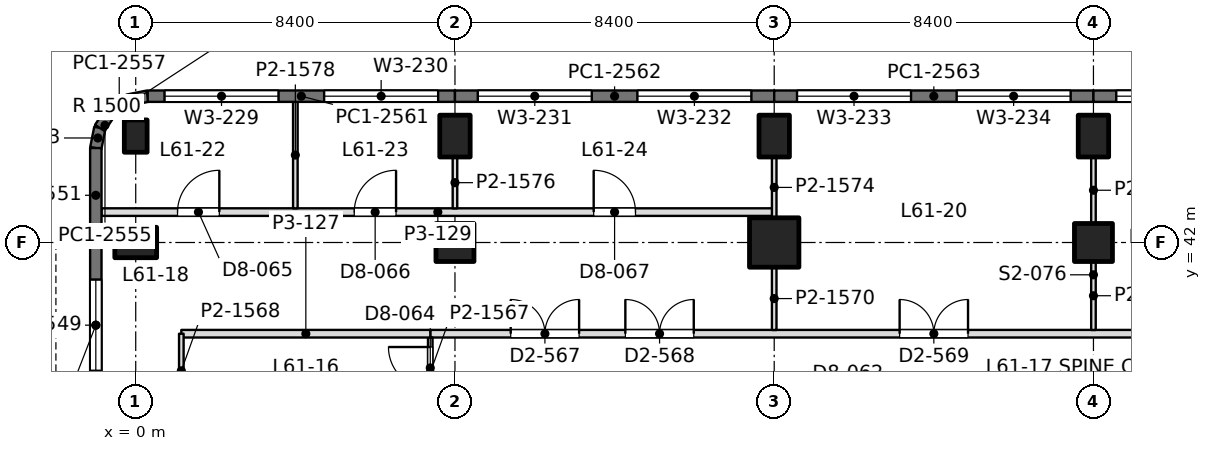
"""IFC4 building model, lengths in metres.
Left out: names, types, materials, properties, quantities, classifications, styles, units other than length and angle.
Written with IfcOpenShell. Run it as: python <this file> out.ifc"""

import sys

from ifc_helpers import new_model, si_unit, direction, frame, frame_2d, origin, origin_2d, place, context, subcontext, project, spatial, rectangle, extrude, element, fill, save


model = new_model("IFC4")
c1 = context("Model", 3, precision=1e-05, world=origin(), true_north=direction((0.0, 1.0)))
c2 = subcontext(c1, "Body", "Model", "MODEL_VIEW")
j1 = project(units=[si_unit("LENGTHUNIT", "METRE"), si_unit("PLANEANGLEUNIT", "RADIAN")], contexts=[c1])
p1 = place(None, origin())
s1 = spatial("IfcSite", under=j1, at=p1, CompositionType="ELEMENT")
p2 = place(p1, origin())
s2 = spatial("IfcBuilding", under=s1, at=p2, CompositionType="ELEMENT")
p3 = place(p2, frame((0.0, 0.0, 268.2)))
s3 = spatial("IfcBuildingStorey", under=s2, at=p3, CompositionType="ELEMENT", Elevation=268.2)
p4 = place(p3, frame((0.0, 42.0, 0.0), z_axis=(0.0, 0.0, 1.0), x_axis=(0.0, 1.0, 0.0)))
e1 = element("IfcColumn", 1, at=p4, inside=s3, PredefinedType="COLUMN", context=c2, shape_type="SweptSolid", body=[
    extrude(rectangle(XDim=0.8, YDim=1.1, at=origin_2d()), origin(), (0.0, 0.0, 1.0), 4.5),
])
p5 = place(p3, frame((0.0, 44.8, 0.0), z_axis=(0.0, 0.0, 1.0), x_axis=(1.0, 0.0, 0.0)))
e2 = element("IfcColumn", 2, at=p5, inside=s3, PredefinedType="COLUMN", context=c2, shape_type="SweptSolid", body=[
    extrude(rectangle(XDim=0.6, YDim=0.85, at=origin_2d()), origin(), (0.0, 0.0, 1.0), 4.5),
])
p6 = place(p3, frame((8.4, 42.0, 0.0), z_axis=(0.0, 0.0, 1.0), x_axis=(1.0, 0.0, 0.0)))
e3 = element("IfcColumn", 3, at=p6, inside=s3, PredefinedType="COLUMN", context=c2, shape_type="SweptSolid", body=[
    extrude(rectangle(XDim=1.0, YDim=1.0, at=origin_2d()), origin(), (0.0, 0.0, 1.0), 4.5),
])
p7 = place(p3, frame((8.4, 44.8, 0.0), z_axis=(0.0, 0.0, 1.0), x_axis=(1.0, 0.0, 0.0)))
e4 = element("IfcColumn", 4, at=p7, inside=s3, PredefinedType="COLUMN", context=c2, shape_type="SweptSolid", body=[
    extrude(rectangle(XDim=0.8, YDim=1.1, at=origin_2d()), origin(), (0.0, 0.0, 1.0), 4.5),
])
p8 = place(p3, frame((16.8, 42.0, 0.0), z_axis=(0.0, 0.0, 1.0), x_axis=(1.0, 0.0, 0.0)))
e5 = element("IfcColumn", 5, at=p8, inside=s3, PredefinedType="COLUMN", context=c2, shape_type="SweptSolid", body=[
    extrude(rectangle(XDim=1.3, YDim=1.3, at=origin_2d()), origin(), (0.0, 0.0, 1.0), 4.5),
])
p9 = place(p3, frame((16.8, 44.8, 0.0), z_axis=(0.0, 0.0, 1.0), x_axis=(1.0, 0.0, 0.0)))
e6 = element("IfcColumn", 6, at=p9, inside=s3, PredefinedType="COLUMN", context=c2, shape_type="SweptSolid", body=[
    extrude(rectangle(XDim=0.8, YDim=1.1, at=origin_2d()), origin(), (0.0, 0.0, 1.0), 4.5),
])
p10 = place(p3, frame((25.2, 42.0, 0.0), z_axis=(0.0, 0.0, 1.0), x_axis=(1.0, 0.0, 0.0)))
e7 = element("IfcColumn", 7, at=p10, inside=s3, PredefinedType="COLUMN", context=c2, shape_type="SweptSolid", body=[
    extrude(rectangle(XDim=1.0, YDim=1.0, at=origin_2d()), origin(), (0.0, 0.0, 1.0), 4.5),
])
p11 = place(p3, frame((25.2, 44.8, 0.0), z_axis=(0.0, 0.0, 1.0), x_axis=(1.0, 0.0, 0.0)))
e8 = element("IfcColumn", 8, at=p11, inside=s3, PredefinedType="COLUMN", context=c2, shape_type="SweptSolid", body=[
    extrude(rectangle(XDim=0.8, YDim=1.1, at=origin_2d()), origin(), (0.0, 0.0, 1.0), 4.5),
])
p12 = place(p3, frame((-1.05, 37.65, 0.0), z_axis=(0.0, 0.0, 1.0), x_axis=(0.0, 1.0, 0.0)))
e9 = element("IfcWall", 9, at=p12, inside=s3, PredefinedType="SOLIDWALL", context=c2, shape_type="SweptSolid", body=[
    extrude(rectangle(XDim=4.35, YDim=0.3, at=frame_2d((2.175, 0.0))), origin(), (0.0, 0.0, 1.0), 4.35),
])
p13 = place(p12, frame((0.975, 0.0, 0.9)))
e10 = element("IfcOpeningElement", 10, at=p13, cuts=e9, PredefinedType="OPENING", context=c2, shape_type="SweptSolid", body=[
    extrude(rectangle(XDim=2.4, YDim=1.9, at=frame_2d((1.2, 0.95))), frame((0.0, 0.16, 0.0), z_axis=(0.0, -1.0, 0.0), x_axis=(1.0, 0.0, 0.0)), (0.0, 0.0, 1.0), 0.32),
])
p14 = place(p3, frame((-1.05, 42.0, 0.0), z_axis=(0.0, 0.0, 1.0), x_axis=(0.0, 1.0, 0.0)))
e11 = element("IfcWall", 11, at=p14, inside=s3, PredefinedType="SOLIDWALL", context=c2, shape_type="SweptSolid", body=[
    extrude(rectangle(XDim=2.485, YDim=0.3, at=frame_2d((1.243, 0.0))), origin(), (0.0, 0.0, 1.0), 4.35),
])
p15 = place(p3, frame((-1.05, 44.485, 0.0), z_axis=(0.0, 0.0, 1.0), x_axis=(0.195073962632, 0.980788534345, 0.0)))
e12 = element("IfcWall", 12, at=p15, inside=s3, PredefinedType="SOLIDWALL", context=c2, shape_type="SweptSolid", body=[
    extrude(rectangle(XDim=0.541, YDim=0.3, at=frame_2d((0.271, 0.0))), origin(), (0.0, 0.0, 1.0), 4.35),
])
p16 = place(p3, frame((-0.945, 45.015, 0.0), z_axis=(0.0, 0.0, 1.0), x_axis=(0.55534295404, 0.831621430339, 0.0)))
e13 = element("IfcWall", 13, at=p16, inside=s3, PredefinedType="SOLIDWALL", context=c2, shape_type="SweptSolid", body=[
    extrude(rectangle(XDim=0.526, YDim=0.3, at=frame_2d((0.263, 0.0))), origin(), (0.0, 0.0, 1.0), 4.35),
])
p17 = place(p3, frame((-0.653, 45.453, 0.0), z_axis=(0.0, 0.0, 1.0), x_axis=(0.831692711774, 0.555236195849, 0.0)))
e14 = element("IfcWall", 14, at=p17, inside=s3, PredefinedType="SOLIDWALL", context=c2, shape_type="SweptSolid", body=[
    extrude(rectangle(XDim=0.525, YDim=0.3, at=frame_2d((0.263, 0.0))), origin(), (0.0, 0.0, 1.0), 4.35),
])
p18 = place(p3, frame((-0.216, 45.744, 0.0), z_axis=(0.0, 0.0, 1.0), x_axis=(0.980702050465, 0.1955082817, 0.0)))
e15 = element("IfcWall", 15, at=p18, inside=s3, PredefinedType="SOLIDWALL", context=c2, shape_type="SweptSolid", body=[
    extrude(rectangle(XDim=0.541, YDim=0.3, at=frame_2d((0.271, 0.0))), origin(), (0.0, 0.0, 1.0), 4.35),
])
p19 = place(p3, frame((0.315, 45.85, 0.0), z_axis=(0.0, 0.0, 1.0), x_axis=(1.0, 0.0, 0.0)))
e16 = element("IfcWall", 16, at=p19, inside=s3, PredefinedType="SOLIDWALL", context=c2, shape_type="SweptSolid", body=[
    extrude(rectangle(XDim=8.085, YDim=0.3, at=frame_2d((4.042, 0.0))), origin(), (0.0, 0.0, 1.0), 4.35),
])
p20 = place(p19, frame((0.443, 0.0, 0.9)))
e17 = element("IfcOpeningElement", 17, at=p20, cuts=e16, PredefinedType="OPENING", context=c2, shape_type="SweptSolid", body=[
    extrude(rectangle(XDim=3.0, YDim=2.4, at=frame_2d((1.5, 1.2))), frame((0.0, 0.16, 0.0), z_axis=(0.0, -1.0, 0.0), x_axis=(1.0, 0.0, 0.0)), (0.0, 0.0, 1.0), 0.32),
])
p21 = place(p19, frame((4.643, 0.0, 0.9)))
e18 = element("IfcOpeningElement", 18, at=p21, cuts=e16, PredefinedType="OPENING", context=c2, shape_type="SweptSolid", body=[
    extrude(rectangle(XDim=3.0, YDim=2.4, at=frame_2d((1.5, 1.2))), frame((0.0, 0.16, 0.0), z_axis=(0.0, -1.0, 0.0), x_axis=(1.0, 0.0, 0.0)), (0.0, 0.0, 1.0), 0.32),
])
p22 = place(p3, frame((8.4, 45.85, 0.0), z_axis=(0.0, 0.0, 1.0), x_axis=(1.0, 0.0, 0.0)))
e19 = element("IfcWall", 19, at=p22, inside=s3, PredefinedType="SOLIDWALL", context=c2, shape_type="SweptSolid", body=[
    extrude(rectangle(XDim=8.4, YDim=0.3, at=frame_2d((4.2, 0.0))), origin(), (0.0, 0.0, 1.0), 4.35),
])
p23 = place(p22, frame((0.6, 0.0, 0.9)))
e20 = element("IfcOpeningElement", 20, at=p23, cuts=e19, PredefinedType="OPENING", context=c2, shape_type="SweptSolid", body=[
    extrude(rectangle(XDim=3.0, YDim=2.4, at=frame_2d((1.5, 1.2))), frame((0.0, 0.16, 0.0), z_axis=(0.0, -1.0, 0.0), x_axis=(1.0, 0.0, 0.0)), (0.0, 0.0, 1.0), 0.32),
])
p24 = place(p22, frame((4.8, 0.0, 0.9)))
e21 = element("IfcOpeningElement", 21, at=p24, cuts=e19, PredefinedType="OPENING", context=c2, shape_type="SweptSolid", body=[
    extrude(rectangle(XDim=3.0, YDim=2.4, at=frame_2d((1.5, 1.2))), frame((0.0, 0.16, 0.0), z_axis=(0.0, -1.0, 0.0), x_axis=(1.0, 0.0, 0.0)), (0.0, 0.0, 1.0), 0.32),
])
p25 = place(p3, frame((16.8, 45.85, 0.0), z_axis=(0.0, 0.0, 1.0), x_axis=(1.0, 0.0, 0.0)))
e22 = element("IfcWall", 22, at=p25, inside=s3, PredefinedType="SOLIDWALL", context=c2, shape_type="SweptSolid", body=[
    extrude(rectangle(XDim=8.4, YDim=0.3, at=frame_2d((4.2, 0.0))), origin(), (0.0, 0.0, 1.0), 4.35),
])
p26 = place(p25, frame((0.6, 0.0, 0.9)))
e23 = element("IfcOpeningElement", 23, at=p26, cuts=e22, PredefinedType="OPENING", context=c2, shape_type="SweptSolid", body=[
    extrude(rectangle(XDim=3.0, YDim=2.4, at=frame_2d((1.5, 1.2))), frame((0.0, 0.16, 0.0), z_axis=(0.0, -1.0, 0.0), x_axis=(1.0, 0.0, 0.0)), (0.0, 0.0, 1.0), 0.32),
])
p27 = place(p25, frame((4.8, 0.0, 0.9)))
e24 = element("IfcOpeningElement", 24, at=p27, cuts=e22, PredefinedType="OPENING", context=c2, shape_type="SweptSolid", body=[
    extrude(rectangle(XDim=3.0, YDim=2.4, at=frame_2d((1.5, 1.2))), frame((0.0, 0.16, 0.0), z_axis=(0.0, -1.0, 0.0), x_axis=(1.0, 0.0, 0.0)), (0.0, 0.0, 1.0), 0.32),
])
p28 = place(p3, frame((25.2, 45.85, 0.0), z_axis=(0.0, 0.0, 1.0), x_axis=(1.0, 0.0, 0.0)))
e25 = element("IfcWall", 25, at=p28, inside=s3, PredefinedType="SOLIDWALL", context=c2, shape_type="SweptSolid", body=[
    extrude(rectangle(XDim=8.4, YDim=0.3, at=frame_2d((4.2, 0.0))), origin(), (0.0, 0.0, 1.0), 4.35),
])
p29 = place(p28, frame((0.6, 0.0, 0.9)))
e26 = element("IfcOpeningElement", 26, at=p29, cuts=e25, PredefinedType="OPENING", context=c2, shape_type="SweptSolid", body=[
    extrude(rectangle(XDim=3.0, YDim=2.4, at=frame_2d((1.5, 1.2))), frame((0.0, 0.16, 0.0), z_axis=(0.0, -1.0, 0.0), x_axis=(1.0, 0.0, 0.0)), (0.0, 0.0, 1.0), 0.32),
])
p30 = place(p28, frame((4.8, 0.0, 0.9)))
e27 = element("IfcOpeningElement", 27, at=p30, cuts=e25, PredefinedType="OPENING", context=c2, shape_type="SweptSolid", body=[
    extrude(rectangle(XDim=3.0, YDim=2.4, at=frame_2d((1.5, 1.2))), frame((0.0, 0.16, 0.0), z_axis=(0.0, -1.0, 0.0), x_axis=(1.0, 0.0, 0.0)), (0.0, 0.0, 1.0), 0.32),
])
p31 = place(p3, frame((-0.902, 42.8, 0.0), z_axis=(0.0, 0.0, 1.0), x_axis=(1.0, 0.0, 0.0)))
e28 = element("IfcWall", 28, at=p31, inside=s3, PredefinedType="PARTITIONING", context=c2, shape_type="SweptSolid", body=[
    extrude(rectangle(XDim=17.702, YDim=0.2, at=frame_2d((8.851, 0.0))), origin(), (0.0, 0.0, 1.0), 3.86),
])
p32 = place(p31, frame((2.002, 0.0, 0.0)))
e29 = element("IfcOpeningElement", 29, at=p32, cuts=e28, PredefinedType="OPENING", context=c2, shape_type="SweptSolid", body=[
    extrude(rectangle(XDim=1.1, YDim=2.4, at=frame_2d((0.55, 1.2))), frame((0.0, 0.11, 0.0), z_axis=(0.0, -1.0, 0.0), x_axis=(1.0, 0.0, 0.0)), (0.0, 0.0, 1.0), 0.22),
])
p33 = place(p31, frame((6.652, 0.0, 0.0)))
e30 = element("IfcOpeningElement", 30, at=p33, cuts=e28, PredefinedType="OPENING", context=c2, shape_type="SweptSolid", body=[
    extrude(rectangle(XDim=1.1, YDim=2.4, at=frame_2d((0.55, 1.2))), frame((0.0, 0.11, 0.0), z_axis=(0.0, -1.0, 0.0), x_axis=(1.0, 0.0, 0.0)), (0.0, 0.0, 1.0), 0.22),
])
p34 = place(p31, frame((12.952, 0.0, 0.0)))
e31 = element("IfcOpeningElement", 31, at=p34, cuts=e28, PredefinedType="OPENING", context=c2, shape_type="SweptSolid", body=[
    extrude(rectangle(XDim=1.1, YDim=2.4, at=frame_2d((0.55, 1.2))), frame((0.0, 0.11, 0.0), z_axis=(0.0, -1.0, 0.0), x_axis=(1.0, 0.0, 0.0)), (0.0, 0.0, 1.0), 0.22),
])
p35 = place(p3, frame((4.2, 42.898, 0.0), z_axis=(0.0, 0.0, 1.0), x_axis=(0.0, 1.0, 0.0)))
e32 = element("IfcWall", 32, at=p35, inside=s3, PredefinedType="PARTITIONING", context=c2, shape_type="SweptSolid", body=[
    extrude(rectangle(XDim=2.804, YDim=0.12, at=frame_2d((1.402, 0.0))), origin(), (0.0, 0.0, 1.0), 3.86),
])
p36 = place(p3, frame((8.4, 42.898, 0.0), z_axis=(0.0, 0.0, 1.0), x_axis=(0.0, 1.0, 0.0)))
e33 = element("IfcWall", 33, at=p36, inside=s3, PredefinedType="PARTITIONING", context=c2, shape_type="SweptSolid", body=[
    extrude(rectangle(XDim=1.353, YDim=0.12, at=frame_2d((0.677, 0.0))), origin(), (0.0, 0.0, 1.0), 3.99),
])
p37 = place(p3, frame((16.8, 42.648, 0.0), z_axis=(0.0, 0.0, 1.0), x_axis=(0.0, 1.0, 0.0)))
e34 = element("IfcWall", 34, at=p37, inside=s3, PredefinedType="PARTITIONING", context=c2, shape_type="SweptSolid", body=[
    extrude(rectangle(XDim=1.603, YDim=0.12, at=frame_2d((0.802, 0.0))), origin(), (0.0, 0.0, 1.0), 3.99),
])
p38 = place(p3, frame((16.8, 39.698, 0.0), z_axis=(0.0, 0.0, 1.0), x_axis=(0.0, 1.0, 0.0)))
e35 = element("IfcWall", 35, at=p38, inside=s3, PredefinedType="PARTITIONING", context=c2, shape_type="SweptSolid", body=[
    extrude(rectangle(XDim=1.653, YDim=0.12, at=frame_2d((0.827, 0.0))), origin(), (0.0, 0.0, 1.0), 3.99),
])
p39 = place(p3, frame((25.2, 39.698, 0.0), z_axis=(0.0, 0.0, 1.0), x_axis=(0.0, 1.0, 0.0)))
e36 = element("IfcWall", 36, at=p39, inside=s3, PredefinedType="PARTITIONING", context=c2, shape_type="SweptSolid", body=[
    extrude(rectangle(XDim=1.803, YDim=0.12, at=frame_2d((0.901, 0.0))), origin(), (0.0, 0.0, 1.0), 3.8),
])
p40 = place(p3, frame((25.2, 42.499, 0.0), z_axis=(0.0, 0.0, 1.0), x_axis=(0.0, 1.0, 0.0)))
e37 = element("IfcWall", 37, at=p40, inside=s3, PredefinedType="PARTITIONING", context=c2, shape_type="SweptSolid", body=[
    extrude(rectangle(XDim=1.752, YDim=0.12, at=frame_2d((0.876, 0.0))), origin(), (0.0, 0.0, 1.0), 3.99),
])
p41 = place(p3, frame((7.748, 39.6, 0.0), z_axis=(0.0, 0.0, 1.0), x_axis=(1.0, 0.0, 0.0)))
e38 = element("IfcWall", 38, at=p41, inside=s3, PredefinedType="PARTITIONING", context=c2, shape_type="SweptSolid", body=[
    extrude(rectangle(XDim=41.452, YDim=0.2, at=frame_2d((20.726, 0.0))), origin(), (0.0, 0.0, 1.0), 3.8),
])
p42 = place(p41, frame((2.119, 0.0, 0.0)))
e39 = element("IfcOpeningElement", 39, at=p42, cuts=e38, PredefinedType="OPENING", context=c2, shape_type="SweptSolid", body=[
    extrude(rectangle(XDim=1.8, YDim=2.2, at=frame_2d((0.9, 1.1))), frame((0.0, 0.11, 0.0), z_axis=(0.0, -1.0, 0.0), x_axis=(1.0, 0.0, 0.0)), (0.0, 0.0, 1.0), 0.22),
])
p43 = place(p41, frame((5.135, 0.0, 0.0)))
e40 = element("IfcOpeningElement", 40, at=p43, cuts=e38, PredefinedType="OPENING", context=c2, shape_type="SweptSolid", body=[
    extrude(rectangle(XDim=1.8, YDim=2.2, at=frame_2d((0.9, 1.1))), frame((0.0, 0.11, 0.0), z_axis=(0.0, -1.0, 0.0), x_axis=(1.0, 0.0, 0.0)), (0.0, 0.0, 1.0), 0.22),
])
p44 = place(p41, frame((12.352, 0.0, 0.0)))
e41 = element("IfcOpeningElement", 41, at=p44, cuts=e38, PredefinedType="OPENING", context=c2, shape_type="SweptSolid", body=[
    extrude(rectangle(XDim=1.8, YDim=2.2, at=frame_2d((0.9, 1.1))), frame((0.0, 0.11, 0.0), z_axis=(0.0, -1.0, 0.0), x_axis=(1.0, 0.0, 0.0)), (0.0, 0.0, 1.0), 0.22),
])
p45 = place(p41, frame((20.752, 0.0, 0.0)))
e42 = element("IfcOpeningElement", 42, at=p45, cuts=e38, PredefinedType="OPENING", context=c2, shape_type="SweptSolid", body=[
    extrude(rectangle(XDim=1.8, YDim=2.2, at=frame_2d((0.9, 1.1))), frame((0.0, 0.11, 0.0), z_axis=(0.0, -1.0, 0.0), x_axis=(1.0, 0.0, 0.0)), (0.0, 0.0, 1.0), 0.22),
])
p46 = place(p41, frame((30.152, 0.0, 0.0)))
e43 = element("IfcOpeningElement", 43, at=p46, cuts=e38, PredefinedType="OPENING", context=c2, shape_type="SweptSolid", body=[
    extrude(rectangle(XDim=1.8, YDim=2.2, at=frame_2d((0.9, 1.1))), frame((0.0, 0.11, 0.0), z_axis=(0.0, -1.0, 0.0), x_axis=(1.0, 0.0, 0.0)), (0.0, 0.0, 1.0), 0.22),
])
p47 = place(p41, frame((35.352, 0.0, 0.0)))
e44 = element("IfcOpeningElement", 44, at=p47, cuts=e38, PredefinedType="OPENING", context=c2, shape_type="SweptSolid", body=[
    extrude(rectangle(XDim=1.8, YDim=2.2, at=frame_2d((0.9, 1.1))), frame((0.0, 0.11, 0.0), z_axis=(0.0, -1.0, 0.0), x_axis=(1.0, 0.0, 0.0)), (0.0, 0.0, 1.0), 0.22),
])
p48 = place(p3, frame((7.75, 37.648, 0.0), z_axis=(0.0, 0.0, 1.0), x_axis=(0.0, 1.0, 0.0)))
e45 = element("IfcWall", 45, at=p48, inside=s3, PredefinedType="PARTITIONING", context=c2, shape_type="SweptSolid", body=[
    extrude(rectangle(XDim=1.854, YDim=0.12, at=frame_2d((0.927, 0.0))), origin(), (0.0, 0.0, 1.0), 4.35),
])
p49 = place(p48, frame((0.502, 0.0, 0.0)))
e46 = element("IfcOpeningElement", 46, at=p49, cuts=e45, PredefinedType="OPENING", context=c2, shape_type="SweptSolid", body=[
    extrude(rectangle(XDim=1.1, YDim=2.4, at=frame_2d((0.55, 1.2))), frame((0.0, 0.07, 0.0), z_axis=(0.0, -1.0, 0.0), x_axis=(1.0, 0.0, 0.0)), (0.0, 0.0, 1.0), 0.14),
])
p50 = place(p3, frame((1.2, 39.6, 0.0), z_axis=(0.0, 0.0, 1.0), x_axis=(1.0, 0.0, 0.0)))
e47 = element("IfcWall", 47, at=p50, inside=s3, PredefinedType="PARTITIONING", context=c2, shape_type="SweptSolid", body=[
    extrude(rectangle(XDim=6.552, YDim=0.2, at=frame_2d((3.276, 0.0))), origin(), (0.0, 0.0, 1.0), 3.99),
])
p51 = place(p3, frame((1.2, 37.648, 0.0), z_axis=(0.0, 0.0, 1.0), x_axis=(0.0, 1.0, 0.0)))
e48 = element("IfcWall", 48, at=p51, inside=s3, PredefinedType="PARTITIONING", context=c2, shape_type="SweptSolid", body=[
    extrude(rectangle(XDim=1.952, YDim=0.12, at=frame_2d((0.976, 0.0))), origin(), (0.0, 0.0, 1.0), 4.35),
])
p52 = place(p13, origin())
e49 = element("IfcWindow", 49, at=p52, inside=s3, PartitioningType="SINGLE_PANEL", PredefinedType="WINDOW", context=c2, shape_type="SweptSolid", body=[
    extrude(rectangle(XDim=2.4, YDim=1.9, at=frame_2d((1.2, 0.95))), frame((0.0, 0.03, 0.0), z_axis=(0.0, -1.0, 0.0), x_axis=(1.0, 0.0, 0.0)), (0.0, 0.0, 1.0), 0.06),
])
fill(e10, e49)
p53 = place(p20, origin())
e50 = element("IfcWindow", 50, at=p53, inside=s3, PartitioningType="SINGLE_PANEL", PredefinedType="WINDOW", context=c2, shape_type="SweptSolid", body=[
    extrude(rectangle(XDim=3.0, YDim=2.4, at=frame_2d((1.5, 1.2))), frame((0.0, 0.03, 0.0), z_axis=(0.0, -1.0, 0.0), x_axis=(1.0, 0.0, 0.0)), (0.0, 0.0, 1.0), 0.06),
])
fill(e17, e50)
p54 = place(p21, origin())
e51 = element("IfcWindow", 51, at=p54, inside=s3, PartitioningType="SINGLE_PANEL", PredefinedType="WINDOW", context=c2, shape_type="SweptSolid", body=[
    extrude(rectangle(XDim=3.0, YDim=2.4, at=frame_2d((1.5, 1.2))), frame((0.0, 0.03, 0.0), z_axis=(0.0, -1.0, 0.0), x_axis=(1.0, 0.0, 0.0)), (0.0, 0.0, 1.0), 0.06),
])
fill(e18, e51)
p55 = place(p23, origin())
e52 = element("IfcWindow", 52, at=p55, inside=s3, PartitioningType="SINGLE_PANEL", PredefinedType="WINDOW", context=c2, shape_type="SweptSolid", body=[
    extrude(rectangle(XDim=3.0, YDim=2.4, at=frame_2d((1.5, 1.2))), frame((0.0, 0.03, 0.0), z_axis=(0.0, -1.0, 0.0), x_axis=(1.0, 0.0, 0.0)), (0.0, 0.0, 1.0), 0.06),
])
fill(e20, e52)
p56 = place(p24, origin())
e53 = element("IfcWindow", 53, at=p56, inside=s3, PartitioningType="SINGLE_PANEL", PredefinedType="WINDOW", context=c2, shape_type="SweptSolid", body=[
    extrude(rectangle(XDim=3.0, YDim=2.4, at=frame_2d((1.5, 1.2))), frame((0.0, 0.03, 0.0), z_axis=(0.0, -1.0, 0.0), x_axis=(1.0, 0.0, 0.0)), (0.0, 0.0, 1.0), 0.06),
])
fill(e21, e53)
p57 = place(p26, origin())
e54 = element("IfcWindow", 54, at=p57, inside=s3, PartitioningType="SINGLE_PANEL", PredefinedType="WINDOW", context=c2, shape_type="SweptSolid", body=[
    extrude(rectangle(XDim=3.0, YDim=2.4, at=frame_2d((1.5, 1.2))), frame((0.0, 0.03, 0.0), z_axis=(0.0, -1.0, 0.0), x_axis=(1.0, 0.0, 0.0)), (0.0, 0.0, 1.0), 0.06),
])
fill(e23, e54)
p58 = place(p27, origin())
e55 = element("IfcWindow", 55, at=p58, inside=s3, PartitioningType="SINGLE_PANEL", PredefinedType="WINDOW", context=c2, shape_type="SweptSolid", body=[
    extrude(rectangle(XDim=3.0, YDim=2.4, at=frame_2d((1.5, 1.2))), frame((0.0, 0.03, 0.0), z_axis=(0.0, -1.0, 0.0), x_axis=(1.0, 0.0, 0.0)), (0.0, 0.0, 1.0), 0.06),
])
fill(e24, e55)
p59 = place(p29, origin())
e56 = element("IfcWindow", 56, at=p59, inside=s3, PartitioningType="SINGLE_PANEL", PredefinedType="WINDOW", context=c2, shape_type="SweptSolid", body=[
    extrude(rectangle(XDim=3.0, YDim=2.4, at=frame_2d((1.5, 1.2))), frame((0.0, 0.03, 0.0), z_axis=(0.0, -1.0, 0.0), x_axis=(1.0, 0.0, 0.0)), (0.0, 0.0, 1.0), 0.06),
])
fill(e26, e56)
p60 = place(p32, origin())
e57 = element("IfcDoor", 57, at=p60, inside=s3, OperationType="SINGLE_SWING_RIGHT", PredefinedType="DOOR", context=c2, shape_type="SweptSolid", body=[
    extrude(rectangle(XDim=1.1, YDim=2.4, at=frame_2d((0.55, 1.2))), frame((0.0, 0.025, 0.0), z_axis=(0.0, -1.0, 0.0), x_axis=(1.0, 0.0, 0.0)), (0.0, 0.0, 1.0), 0.05),
])
fill(e29, e57)
p61 = place(p33, origin())
e58 = element("IfcDoor", 58, at=p61, inside=s3, OperationType="SINGLE_SWING_RIGHT", PredefinedType="DOOR", context=c2, shape_type="SweptSolid", body=[
    extrude(rectangle(XDim=1.1, YDim=2.4, at=frame_2d((0.55, 1.2))), frame((0.0, 0.025, 0.0), z_axis=(0.0, -1.0, 0.0), x_axis=(1.0, 0.0, 0.0)), (0.0, 0.0, 1.0), 0.05),
])
fill(e30, e58)
p62 = place(p34, origin())
e59 = element("IfcDoor", 59, at=p62, inside=s3, OperationType="SINGLE_SWING_LEFT", PredefinedType="DOOR", context=c2, shape_type="SweptSolid", body=[
    extrude(rectangle(XDim=1.1, YDim=2.4, at=frame_2d((0.55, 1.2))), frame((0.0, 0.025, 0.0), z_axis=(0.0, -1.0, 0.0), x_axis=(1.0, 0.0, 0.0)), (0.0, 0.0, 1.0), 0.05),
])
fill(e31, e59)
p63 = place(p42, origin())
e60 = element("IfcDoor", 60, at=p63, inside=s3, OperationType="DOUBLE_DOOR_SINGLE_SWING", PredefinedType="DOOR", context=c2, shape_type="SweptSolid", body=[
    extrude(rectangle(XDim=1.8, YDim=2.2, at=frame_2d((0.9, 1.1))), frame((0.0, 0.025, 0.0), z_axis=(0.0, -1.0, 0.0), x_axis=(1.0, 0.0, 0.0)), (0.0, 0.0, 1.0), 0.05),
])
fill(e39, e60)
p64 = place(p43, origin())
e61 = element("IfcDoor", 61, at=p64, inside=s3, OperationType="DOUBLE_DOOR_SINGLE_SWING", PredefinedType="DOOR", context=c2, shape_type="SweptSolid", body=[
    extrude(rectangle(XDim=1.8, YDim=2.2, at=frame_2d((0.9, 1.1))), frame((0.0, 0.025, 0.0), z_axis=(0.0, -1.0, 0.0), x_axis=(1.0, 0.0, 0.0)), (0.0, 0.0, 1.0), 0.05),
])
fill(e40, e61)
p65 = place(p44, origin())
e62 = element("IfcDoor", 62, at=p65, inside=s3, OperationType="DOUBLE_DOOR_SINGLE_SWING", PredefinedType="DOOR", context=c2, shape_type="SweptSolid", body=[
    extrude(rectangle(XDim=1.8, YDim=2.2, at=frame_2d((0.9, 1.1))), frame((0.0, 0.025, 0.0), z_axis=(0.0, -1.0, 0.0), x_axis=(1.0, 0.0, 0.0)), (0.0, 0.0, 1.0), 0.05),
])
fill(e41, e62)
p66 = place(p49, origin())
e63 = element("IfcDoor", 63, at=p66, inside=s3, OperationType="SINGLE_SWING_RIGHT", PredefinedType="DOOR", context=c2, shape_type="SweptSolid", body=[
    extrude(rectangle(XDim=1.1, YDim=2.4, at=frame_2d((0.55, 1.2))), frame((0.0, 0.025, 0.0), z_axis=(0.0, -1.0, 0.0), x_axis=(1.0, 0.0, 0.0)), (0.0, 0.0, 1.0), 0.05),
])
fill(e46, e63)
save(model, sys.argv[1])
